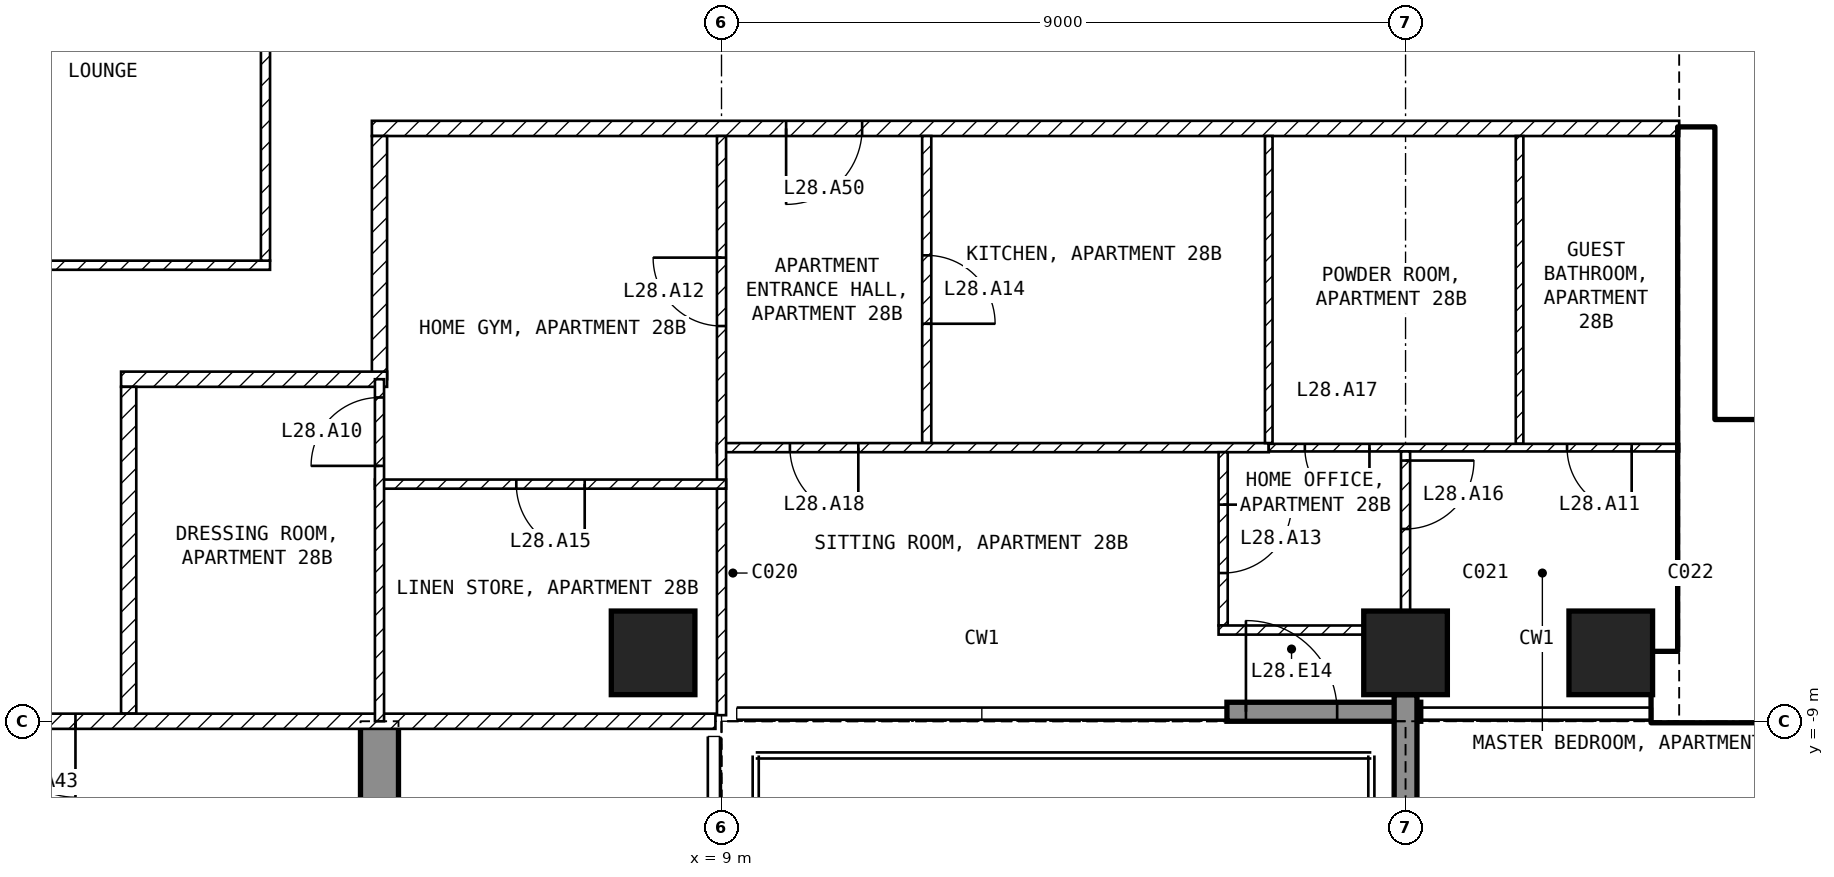
"""IFC4 building model, lengths in metres.
Left out: names, types, materials, properties, quantities, classifications, styles, units other than length and angle.
Written with IfcOpenShell. Run it as: python <this file> out.ifc"""

import sys

from ifc_helpers import new_model, si_unit, direction, frame, frame_2d, origin, origin_2d, place, context, subcontext, project, spatial, polyline, rectangle, outline, extrude, element, fill, save


model = new_model("IFC4")
c1 = context("Model", 3, precision=1e-05, world=origin(), true_north=direction((0.0, 1.0)))
c2 = subcontext(c1, "Body", "Model", "MODEL_VIEW")
j1 = project(units=[si_unit("LENGTHUNIT", "METRE"), si_unit("PLANEANGLEUNIT", "RADIAN")], contexts=[c1])
p1 = place(None, origin())
s1 = spatial("IfcSite", under=j1, at=p1, CompositionType="ELEMENT")
p2 = place(p1, origin())
s2 = spatial("IfcBuilding", under=s1, at=p2, CompositionType="ELEMENT")
p3 = place(p2, frame((0.0, 0.0, 119.9)))
s3 = spatial("IfcBuildingStorey", under=s2, at=p3, CompositionType="ELEMENT", Elevation=119.9)
for number, where, z_axis, x_axis in (
    (1, (8.1, -8.1, -0.25), (0.0, 0.0, 1.0), (1.0, 0.0, 0.0)),
    (2, (18.0, -8.1, -0.25), (0.0, 0.0, 1.0), (1.0, 0.0, 0.0)),
    (3, (20.7, -8.1, -0.25), (0.0, 0.0, 1.0), (1.0, 0.0, 0.0)),
):
    element("IfcColumn", number, at=place(p3, frame(where, z_axis=z_axis, x_axis=x_axis)), inside=s3, PredefinedType="COLUMN", context=c2, shape_type="SweptSolid", body=[
        extrude(rectangle(XDim=1.1, YDim=1.1, at=origin_2d()), origin(), (0.0, 0.0, 1.0), 3.5),
    ])
p4 = place(p3, frame((4.25, -20.15, -0.25), z_axis=(1.0, 0.0, 0.0), x_axis=(0.0, 1.0, 0.0)))
e4 = element("IfcWall", 4, at=p4, inside=s3, PredefinedType="SHEAR", context=c2, shape_type="SweptSolid", body=[
    extrude(outline(polyline([(0.0, 0.0), (6.65, 0.0), (6.65, 2.65), (9.05, 2.65), (9.05, 0.0), (11.15, 0.0), (11.15, 3.5), (0.0, 3.5), (0.0, 0.0)])), origin(), (0.0, 0.0, 1.0), 0.5),
])
p5 = place(p3, frame((15.65, -8.875, 0.0), z_axis=(0.0, 0.0, 1.0), x_axis=(1.0, 0.0, 0.0)))
e5 = element("IfcWall", 5, at=p5, inside=s3, PredefinedType="SOLIDWALL", context=c2, shape_type="SweptSolid", body=[
    extrude(rectangle(XDim=2.55, YDim=0.25, at=frame_2d((1.275, 0.0))), origin(), (0.0, 0.0, 1.0), 3.25),
])
p6 = place(p5, frame((0.25, 0.0, 0.0)))
e6 = element("IfcOpeningElement", 6, at=p6, cuts=e5, PredefinedType="OPENING", context=c2, shape_type="SweptSolid", body=[
    extrude(rectangle(XDim=1.2, YDim=2.4, at=frame_2d((0.6, 1.2))), frame((0.0, 0.135, 0.0), z_axis=(0.0, -1.0, 0.0), x_axis=(1.0, 0.0, 0.0)), (0.0, 0.0, 1.0), 0.27),
])
p7 = place(p3, frame((18.0, -8.65, 0.0), z_axis=(0.0, 0.0, 1.0), x_axis=(0.0, -1.0, 0.0)))
e7 = element("IfcWall", 7, at=p7, inside=s3, PredefinedType="SOLIDWALL", context=c2, shape_type="SweptSolid", body=[
    extrude(rectangle(XDim=3.09, YDim=0.3, at=frame_2d((1.545, 0.0))), origin(), (0.0, 0.0, 1.0), 3.25),
])
p8 = place(p3, frame((21.25, -8.55, 0.0), z_axis=(0.0, 0.0, 1.0), x_axis=(1.0, 0.0, 0.0)))
e8 = element("IfcWall", 8, at=p8, inside=s3, PredefinedType="SHEAR", context=c2, shape_type="SweptSolid", body=[
    extrude(rectangle(XDim=8.95, YDim=0.9, at=frame_2d((4.475, 0.0))), origin(), (0.0, 0.0, 1.0), 3.25),
])
p9 = place(p3, frame((21.825, -8.1, 0.0), z_axis=(0.0, 0.0, 1.0), x_axis=(0.0, 1.0, 0.0)))
e9 = element("IfcWall", 9, at=p9, inside=s3, PredefinedType="SHEAR", context=c2, shape_type="SweptSolid", body=[
    extrude(rectangle(XDim=6.9, YDim=0.45, at=frame_2d((3.45, 0.0))), origin(), (0.0, 0.0, 1.0), 3.25),
])
p10 = place(p3, frame((22.05, -5.15, 0.0), z_axis=(0.0, 0.0, 1.0), x_axis=(1.0, 0.0, 0.0)))
e10 = element("IfcWall", 10, at=p10, inside=s3, PredefinedType="SOLIDWALL", context=c2, shape_type="SweptSolid", body=[
    extrude(rectangle(XDim=6.3, YDim=0.2, at=frame_2d((3.15, 0.0))), origin(), (0.0, 0.0, 1.0), 3.25),
])
p11 = place(p10, frame((0.2, 0.0, 0.0)))
e11 = element("IfcOpeningElement", 11, at=p11, cuts=e10, PredefinedType="OPENING", context=c2, shape_type="SweptSolid", body=[
    extrude(rectangle(XDim=1.0, YDim=2.1, at=frame_2d((0.5, 1.05))), frame((0.0, 0.11, 0.0), z_axis=(0.0, -1.0, 0.0), x_axis=(1.0, 0.0, 0.0)), (0.0, 0.0, 1.0), 0.22),
])
p12 = place(p3, frame((-3.06, -3.0, 0.0), z_axis=(0.0, 0.0, 1.0), x_axis=(1.0, 0.0, 0.0)))
e12 = element("IfcWall", 12, at=p12, inside=s3, PredefinedType="PARTITIONING", context=c2, shape_type="SweptSolid", body=[
    extrude(rectangle(XDim=6.12, YDim=0.12, at=frame_2d((3.06, 0.0))), origin(), (0.0, 0.0, 1.0), 3.25),
])
p13 = place(p3, frame((3.0, -2.94, 0.0), z_axis=(0.0, 0.0, 1.0), x_axis=(0.0, 1.0, 0.0)))
e13 = element("IfcWall", 13, at=p13, inside=s3, PredefinedType="PARTITIONING", context=c2, shape_type="SweptSolid", body=[
    extrude(rectangle(XDim=5.88, YDim=0.12, at=frame_2d((2.94, 0.0))), origin(), (0.0, 0.0, 1.0), 3.25),
])
p14 = place(p3, frame((21.6, -1.2, 0.0), z_axis=(0.0, 0.0, 1.0), x_axis=(-1.0, 0.0, 0.0)))
e14 = element("IfcWall", 14, at=p14, inside=s3, PredefinedType="PARTITIONING", context=c2, shape_type="SweptSolid", body=[
    extrude(rectangle(XDim=17.2, YDim=0.2, at=frame_2d((8.6, 0.0))), origin(), (0.0, 0.0, 1.0), 3.25),
])
p15 = place(p14, frame((10.75, 0.0, 0.0)))
e15 = element("IfcOpeningElement", 15, at=p15, cuts=e14, PredefinedType="OPENING", context=c2, shape_type="SweptSolid", body=[
    extrude(rectangle(XDim=1.0, YDim=2.1, at=frame_2d((0.5, 1.05))), frame((0.0, 0.11, 0.0), z_axis=(0.0, -1.0, 0.0), x_axis=(1.0, 0.0, 0.0)), (0.0, 0.0, 1.0), 0.22),
])
p16 = place(p3, frame((4.5, -1.3, 0.0), z_axis=(0.0, 0.0, 1.0), x_axis=(0.0, -1.0, 0.0)))
e16 = element("IfcWall", 16, at=p16, inside=s3, PredefinedType="PARTITIONING", context=c2, shape_type="SweptSolid", body=[
    extrude(rectangle(XDim=3.2, YDim=0.2, at=frame_2d((1.6, 0.0))), origin(), (0.0, 0.0, 1.0), 3.25),
])
p17 = place(p3, frame((4.6, -4.5, 0.0), z_axis=(0.0, 0.0, 1.0), x_axis=(-1.0, 0.0, 0.0)))
e17 = element("IfcWall", 17, at=p17, inside=s3, PredefinedType="PARTITIONING", context=c2, shape_type="SweptSolid", body=[
    extrude(rectangle(XDim=3.5, YDim=0.2, at=frame_2d((1.75, 0.0))), origin(), (0.0, 0.0, 1.0), 3.25),
])
p18 = place(p3, frame((1.2, -4.6, 0.0), z_axis=(0.0, 0.0, 1.0), x_axis=(0.0, -1.0, 0.0)))
e18 = element("IfcWall", 18, at=p18, inside=s3, PredefinedType="PARTITIONING", context=c2, shape_type="SweptSolid", body=[
    extrude(rectangle(XDim=4.3, YDim=0.2, at=frame_2d((2.15, 0.0))), origin(), (0.0, 0.0, 1.0), 3.25),
])
p19 = place(p3, frame((8.92, -9.0, 0.0), z_axis=(0.0, 0.0, 1.0), x_axis=(-1.0, 0.0, 0.0)))
e19 = element("IfcWall", 19, at=p19, inside=s3, PredefinedType="PARTITIONING", context=c2, shape_type="SweptSolid", body=[
    extrude(rectangle(XDim=17.84, YDim=0.2, at=frame_2d((8.92, 0.0))), origin(), (0.0, 0.0, 1.0), 3.25),
])
p20 = place(p19, frame((8.42, 0.0, 0.0)))
e20 = element("IfcOpeningElement", 20, at=p20, cuts=e19, PredefinedType="OPENING", context=c2, shape_type="SweptSolid", body=[
    extrude(rectangle(XDim=1.0, YDim=2.1, at=frame_2d((0.5, 1.05))), frame((0.0, 0.11, 0.0), z_axis=(0.0, -1.0, 0.0), x_axis=(1.0, 0.0, 0.0)), (0.0, 0.0, 1.0), 0.22),
])
p21 = place(p3, frame((11.7, -1.3, 0.0), z_axis=(0.0, 0.0, 1.0), x_axis=(0.0, -1.0, 0.0)))
e21 = element("IfcWall", 21, at=p21, inside=s3, PredefinedType="PARTITIONING", context=c2, shape_type="SweptSolid", body=[
    extrude(rectangle(XDim=4.04, YDim=0.12, at=frame_2d((2.02, 0.0))), origin(), (0.0, 0.0, 1.0), 3.25),
])
p22 = place(p21, frame((1.57, 0.0, 0.0)))
e22 = element("IfcOpeningElement", 22, at=p22, cuts=e21, PredefinedType="OPENING", context=c2, shape_type="SweptSolid", body=[
    extrude(rectangle(XDim=0.9, YDim=2.1, at=frame_2d((0.45, 1.05))), frame((0.0, 0.07, 0.0), z_axis=(0.0, -1.0, 0.0), x_axis=(1.0, 0.0, 0.0)), (0.0, 0.0, 1.0), 0.14),
])
p23 = place(p3, frame((16.2, -5.4, 0.0), z_axis=(0.0, 0.0, 1.0), x_axis=(-1.0, 0.0, 0.0)))
e23 = element("IfcWall", 23, at=p23, inside=s3, PredefinedType="PARTITIONING", context=c2, shape_type="SweptSolid", body=[
    extrude(rectangle(XDim=7.26, YDim=0.12, at=frame_2d((3.63, 0.0))), origin(), (0.0, 0.0, 1.0), 3.25),
])
p24 = place(p23, frame((5.4, 0.0, 0.0)))
e24 = element("IfcOpeningElement", 24, at=p24, cuts=e23, PredefinedType="OPENING", context=c2, shape_type="SweptSolid", body=[
    extrude(rectangle(XDim=0.9, YDim=2.1, at=frame_2d((0.45, 1.05))), frame((0.0, 0.07, 0.0), z_axis=(0.0, -1.0, 0.0), x_axis=(1.0, 0.0, 0.0)), (0.0, 0.0, 1.0), 0.14),
])
p25 = place(p3, frame((9.0, -8.92, 0.0), z_axis=(0.0, 0.0, 1.0), x_axis=(0.0, 1.0, 0.0)))
e25 = element("IfcWall", 25, at=p25, inside=s3, PredefinedType="PARTITIONING", context=c2, shape_type="SweptSolid", body=[
    extrude(rectangle(XDim=7.62, YDim=0.12, at=frame_2d((3.81, 0.0))), origin(), (0.0, 0.0, 1.0), 3.25),
])
p26 = place(p25, frame((5.12, 0.0, 0.0)))
e26 = element("IfcOpeningElement", 26, at=p26, cuts=e25, PredefinedType="OPENING", context=c2, shape_type="SweptSolid", body=[
    extrude(rectangle(XDim=0.9, YDim=2.1, at=frame_2d((0.45, 1.05))), frame((0.0, 0.07, 0.0), z_axis=(0.0, -1.0, 0.0), x_axis=(1.0, 0.0, 0.0)), (0.0, 0.0, 1.0), 0.14),
])
p27 = place(p3, frame((16.2, -1.3, 0.0), z_axis=(0.0, 0.0, 1.0), x_axis=(0.0, -1.0, 0.0)))
e27 = element("IfcWall", 27, at=p27, inside=s3, PredefinedType="PARTITIONING", context=c2, shape_type="SweptSolid", body=[
    extrude(rectangle(XDim=4.04, YDim=0.1, at=frame_2d((2.02, 0.0))), origin(), (0.0, 0.0, 1.0), 3.25),
])
p28 = place(p3, frame((19.5, -1.3, 0.0), z_axis=(0.0, 0.0, 1.0), x_axis=(0.0, -1.0, 0.0)))
e28 = element("IfcWall", 28, at=p28, inside=s3, PredefinedType="PARTITIONING", context=c2, shape_type="SweptSolid", body=[
    extrude(rectangle(XDim=4.05, YDim=0.1, at=frame_2d((2.025, 0.0))), origin(), (0.0, 0.0, 1.0), 3.25),
])
p29 = place(p3, frame((21.6, -5.4, 0.0), z_axis=(0.0, 0.0, 1.0), x_axis=(-1.0, 0.0, 0.0)))
e29 = element("IfcWall", 29, at=p29, inside=s3, PredefinedType="PARTITIONING", context=c2, shape_type="SweptSolid", body=[
    extrude(rectangle(XDim=5.4, YDim=0.1, at=frame_2d((2.7, 0.0))), origin(), (0.0, 0.0, 1.0), 3.25),
])
p30 = place(p29, frame((0.625, 0.0, 0.0)))
e30 = element("IfcOpeningElement", 30, at=p30, cuts=e29, PredefinedType="OPENING", context=c2, shape_type="SweptSolid", body=[
    extrude(rectangle(XDim=0.85, YDim=2.1, at=frame_2d((0.425, 1.05))), frame((0.0, 0.06, 0.0), z_axis=(0.0, -1.0, 0.0), x_axis=(1.0, 0.0, 0.0)), (0.0, 0.0, 1.0), 0.12),
])
p31 = place(p29, frame((4.075, 0.0, 0.0)))
e31 = element("IfcOpeningElement", 31, at=p31, cuts=e29, PredefinedType="OPENING", context=c2, shape_type="SweptSolid", body=[
    extrude(rectangle(XDim=0.85, YDim=2.1, at=frame_2d((0.425, 1.05))), frame((0.0, 0.06, 0.0), z_axis=(0.0, -1.0, 0.0), x_axis=(1.0, 0.0, 0.0)), (0.0, 0.0, 1.0), 0.12),
])
p32 = place(p3, frame((15.6, -5.46, 0.0), z_axis=(0.0, 0.0, 1.0), x_axis=(0.0, -1.0, 0.0)))
e32 = element("IfcWall", 32, at=p32, inside=s3, PredefinedType="PARTITIONING", context=c2, shape_type="SweptSolid", body=[
    extrude(rectangle(XDim=2.28, YDim=0.12, at=frame_2d((1.14, 0.0))), origin(), (0.0, 0.0, 1.0), 3.25),
])
p33 = place(p32, frame((0.69, 0.0, 0.0)))
e33 = element("IfcOpeningElement", 33, at=p33, cuts=e32, PredefinedType="OPENING", context=c2, shape_type="SweptSolid", body=[
    extrude(rectangle(XDim=0.9, YDim=2.1, at=frame_2d((0.45, 1.05))), frame((0.0, 0.07, 0.0), z_axis=(0.0, -1.0, 0.0), x_axis=(1.0, 0.0, 0.0)), (0.0, 0.0, 1.0), 0.14),
])
p34 = place(p3, frame((15.54, -7.8, 0.0), z_axis=(0.0, 0.0, 1.0), x_axis=(1.0, 0.0, 0.0)))
e34 = element("IfcWall", 34, at=p34, inside=s3, PredefinedType="PARTITIONING", context=c2, shape_type="SweptSolid", body=[
    extrude(rectangle(XDim=1.91, YDim=0.12, at=frame_2d((0.955, 0.0))), origin(), (0.0, 0.0, 1.0), 3.25),
])
p35 = place(p3, frame((18.0, -5.45, 0.0), z_axis=(0.0, 0.0, 1.0), x_axis=(0.0, -1.0, 0.0)))
e35 = element("IfcWall", 35, at=p35, inside=s3, PredefinedType="PARTITIONING", context=c2, shape_type="SweptSolid", body=[
    extrude(rectangle(XDim=2.1, YDim=0.12, at=frame_2d((1.05, 0.0))), origin(), (0.0, 0.0, 1.0), 2.414),
])
p36 = place(p35, frame((0.12, 0.0, 0.0)))
e36 = element("IfcOpeningElement", 36, at=p36, cuts=e35, PredefinedType="OPENING", context=c2, shape_type="SweptSolid", body=[
    extrude(rectangle(XDim=0.9, YDim=2.1, at=frame_2d((0.45, 1.05))), frame((0.0, 0.07, 0.0), z_axis=(0.0, -1.0, 0.0), x_axis=(1.0, 0.0, 0.0)), (0.0, 0.0, 1.0), 0.14),
])
p37 = place(p3, frame((9.06, -5.88, 0.0), z_axis=(0.0, 0.0, 1.0), x_axis=(-1.0, 0.0, 0.0)))
e37 = element("IfcWall", 37, at=p37, inside=s3, PredefinedType="PARTITIONING", context=c2, shape_type="SweptSolid", body=[
    extrude(rectangle(XDim=4.62, YDim=0.12, at=frame_2d((2.31, 0.0))), origin(), (0.0, 0.0, 1.0), 3.25),
])
p38 = place(p37, frame((1.86, 0.0, 0.0)))
e38 = element("IfcOpeningElement", 38, at=p38, cuts=e37, PredefinedType="OPENING", context=c2, shape_type="SweptSolid", body=[
    extrude(rectangle(XDim=0.9, YDim=2.1, at=frame_2d((0.45, 1.05))), frame((0.0, 0.07, 0.0), z_axis=(0.0, -1.0, 0.0), x_axis=(1.0, 0.0, 0.0)), (0.0, 0.0, 1.0), 0.14),
])
p39 = place(p3, frame((4.5, -9.0, 0.0), z_axis=(0.0, 0.0, 1.0), x_axis=(0.0, 1.0, 0.0)))
e39 = element("IfcWall", 39, at=p39, inside=s3, PredefinedType="PARTITIONING", context=c2, shape_type="SweptSolid", body=[
    extrude(rectangle(XDim=4.5, YDim=0.12, at=frame_2d((2.25, 0.0))), origin(), (0.0, 0.0, 1.0), 3.25),
])
p40 = place(p39, frame((3.36, 0.0, 0.0)))
e40 = element("IfcOpeningElement", 40, at=p40, cuts=e39, PredefinedType="OPENING", context=c2, shape_type="SweptSolid", body=[
    extrude(rectangle(XDim=0.9, YDim=2.1, at=frame_2d((0.45, 1.05))), frame((0.0, 0.07, 0.0), z_axis=(0.0, -1.0, 0.0), x_axis=(1.0, 0.0, 0.0)), (0.0, 0.0, 1.0), 0.14),
])
p41 = place(p6, origin())
e41 = element("IfcDoor", 41, at=p41, inside=s3, OperationType="SINGLE_SWING_LEFT", PredefinedType="DOOR", context=c2, shape_type="SweptSolid", body=[
    extrude(rectangle(XDim=1.2, YDim=2.4, at=frame_2d((0.6, 1.2))), frame((0.0, 0.025, 0.0), z_axis=(0.0, -1.0, 0.0), x_axis=(1.0, 0.0, 0.0)), (0.0, 0.0, 1.0), 0.05),
])
fill(e6, e41)
p42 = place(p11, origin())
e42 = element("IfcDoor", 42, at=p42, inside=s3, OperationType="SINGLE_SWING_LEFT", PredefinedType="DOOR", context=c2, shape_type="SweptSolid", body=[
    extrude(rectangle(XDim=1.0, YDim=2.1, at=frame_2d((0.5, 1.05))), frame((0.0, 0.025, 0.0), z_axis=(0.0, -1.0, 0.0), x_axis=(1.0, 0.0, 0.0)), (0.0, 0.0, 1.0), 0.05),
])
fill(e11, e42)
p43 = place(p40, origin())
e43 = element("IfcDoor", 43, at=p43, inside=s3, OperationType="SINGLE_SWING_LEFT", PredefinedType="DOOR", context=c2, shape_type="SweptSolid", body=[
    extrude(rectangle(XDim=0.9, YDim=2.1, at=frame_2d((0.45, 1.05))), frame((0.0, 0.025, 0.0), z_axis=(0.0, -1.0, 0.0), x_axis=(1.0, 0.0, 0.0)), (0.0, 0.0, 1.0), 0.05),
])
fill(e40, e43)
p44 = place(p30, origin())
e44 = element("IfcDoor", 44, at=p44, inside=s3, OperationType="SINGLE_SWING_LEFT", PredefinedType="DOOR", context=c2, shape_type="SweptSolid", body=[
    extrude(rectangle(XDim=0.85, YDim=2.1, at=frame_2d((0.425, 1.05))), frame((0.0, 0.025, 0.0), z_axis=(0.0, -1.0, 0.0), x_axis=(1.0, 0.0, 0.0)), (0.0, 0.0, 1.0), 0.05),
])
fill(e30, e44)
p45 = place(p26, origin())
e45 = element("IfcDoor", 45, at=p45, inside=s3, OperationType="SINGLE_SWING_RIGHT", PredefinedType="DOOR", context=c2, shape_type="SweptSolid", body=[
    extrude(rectangle(XDim=0.9, YDim=2.1, at=frame_2d((0.45, 1.05))), frame((0.0, 0.025, 0.0), z_axis=(0.0, -1.0, 0.0), x_axis=(1.0, 0.0, 0.0)), (0.0, 0.0, 1.0), 0.05),
])
fill(e26, e45)
p46 = place(p33, origin())
e46 = element("IfcDoor", 46, at=p46, inside=s3, OperationType="SINGLE_SWING_LEFT", PredefinedType="DOOR", context=c2, shape_type="SweptSolid", body=[
    extrude(rectangle(XDim=0.9, YDim=2.1, at=frame_2d((0.45, 1.05))), frame((0.0, 0.025, 0.0), z_axis=(0.0, -1.0, 0.0), x_axis=(1.0, 0.0, 0.0)), (0.0, 0.0, 1.0), 0.05),
])
fill(e33, e46)
p47 = place(p22, origin())
e47 = element("IfcDoor", 47, at=p47, inside=s3, OperationType="SINGLE_SWING_RIGHT", PredefinedType="DOOR", context=c2, shape_type="SweptSolid", body=[
    extrude(rectangle(XDim=0.9, YDim=2.1, at=frame_2d((0.45, 1.05))), frame((0.0, 0.025, 0.0), z_axis=(0.0, -1.0, 0.0), x_axis=(1.0, 0.0, 0.0)), (0.0, 0.0, 1.0), 0.05),
])
fill(e22, e47)
p48 = place(p38, origin())
e48 = element("IfcDoor", 48, at=p48, inside=s3, OperationType="SINGLE_SWING_LEFT", PredefinedType="DOOR", context=c2, shape_type="SweptSolid", body=[
    extrude(rectangle(XDim=0.9, YDim=2.1, at=frame_2d((0.45, 1.05))), frame((0.0, 0.025, 0.0), z_axis=(0.0, -1.0, 0.0), x_axis=(1.0, 0.0, 0.0)), (0.0, 0.0, 1.0), 0.05),
])
fill(e38, e48)
p49 = place(p36, origin())
e49 = element("IfcDoor", 49, at=p49, inside=s3, OperationType="SINGLE_SWING_LEFT", PredefinedType="DOOR", context=c2, shape_type="SweptSolid", body=[
    extrude(rectangle(XDim=0.9, YDim=2.1, at=frame_2d((0.45, 1.05))), frame((0.0, 0.025, 0.0), z_axis=(0.0, -1.0, 0.0), x_axis=(1.0, 0.0, 0.0)), (0.0, 0.0, 1.0), 0.05),
])
fill(e36, e49)
p50 = place(p31, origin())
e50 = element("IfcDoor", 50, at=p50, inside=s3, OperationType="SINGLE_SWING_LEFT", PredefinedType="DOOR", context=c2, shape_type="SweptSolid", body=[
    extrude(rectangle(XDim=0.85, YDim=2.1, at=frame_2d((0.425, 1.05))), frame((0.0, 0.025, 0.0), z_axis=(0.0, -1.0, 0.0), x_axis=(1.0, 0.0, 0.0)), (0.0, 0.0, 1.0), 0.05),
])
fill(e31, e50)
p51 = place(p24, origin())
e51 = element("IfcDoor", 51, at=p51, inside=s3, OperationType="SINGLE_SWING_LEFT", PredefinedType="DOOR", context=c2, shape_type="SweptSolid", body=[
    extrude(rectangle(XDim=0.9, YDim=2.1, at=frame_2d((0.45, 1.05))), frame((0.0, 0.025, 0.0), z_axis=(0.0, -1.0, 0.0), x_axis=(1.0, 0.0, 0.0)), (0.0, 0.0, 1.0), 0.05),
])
fill(e24, e51)
p52 = place(p20, origin())
e52 = element("IfcDoor", 52, at=p52, inside=s3, OperationType="SINGLE_SWING_LEFT", PredefinedType="DOOR", context=c2, shape_type="SweptSolid", body=[
    extrude(rectangle(XDim=1.0, YDim=2.1, at=frame_2d((0.5, 1.05))), frame((0.0, 0.025, 0.0), z_axis=(0.0, -1.0, 0.0), x_axis=(1.0, 0.0, 0.0)), (0.0, 0.0, 1.0), 0.05),
])
fill(e20, e52)
p53 = place(p15, origin())
e53 = element("IfcDoor", 53, at=p53, inside=s3, OperationType="SINGLE_SWING_RIGHT", PredefinedType="DOOR", context=c2, shape_type="SweptSolid", body=[
    extrude(rectangle(XDim=1.0, YDim=2.1, at=frame_2d((0.5, 1.05))), frame((0.0, 0.025, 0.0), z_axis=(0.0, -1.0, 0.0), x_axis=(1.0, 0.0, 0.0)), (0.0, 0.0, 1.0), 0.05),
])
fill(e15, e53)
save(model, sys.argv[1])
